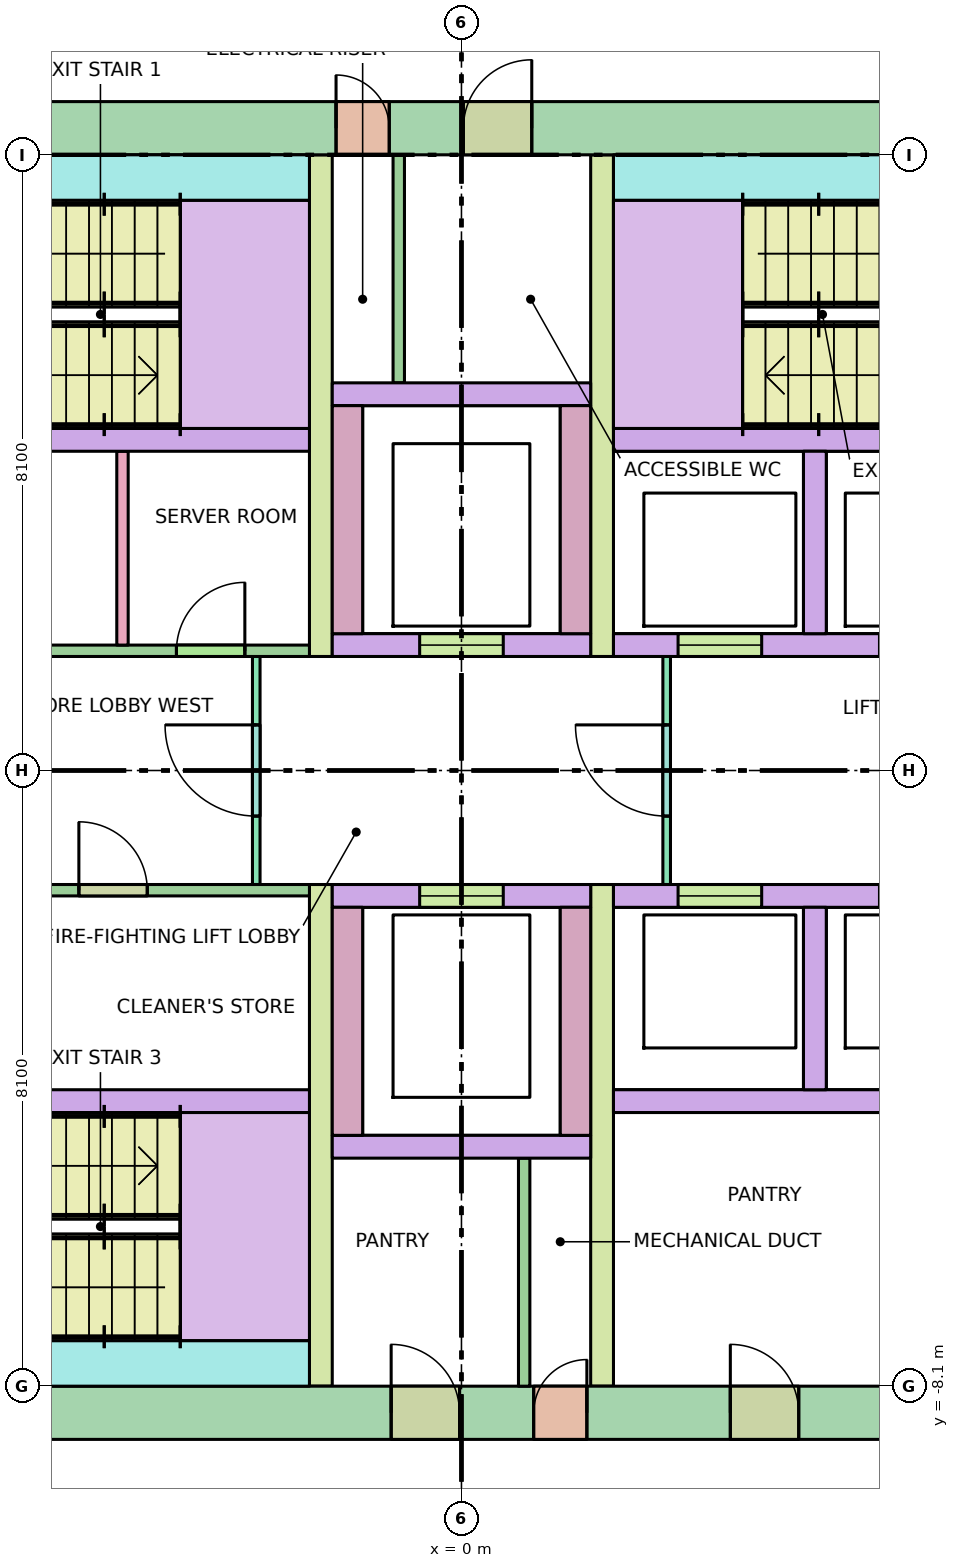
"""IFC4 building model, lengths in metres.
Left out: names, types, materials, properties, quantities, classifications, styles, units other than length and angle.
Written with IfcOpenShell. Run it as: python <this file> out.ifc"""

import sys

from ifc_helpers import new_model, si_unit, direction, frame, frame_2d, origin, place, context, subcontext, project, spatial, rectangle, extrude, element, fill, save


model = new_model("IFC4")
c1 = context("Model", 3, precision=1e-05, world=origin(), true_north=direction((0.0, 1.0)))
c2 = subcontext(c1, "Body", "Model", "MODEL_VIEW")
j1 = project(units=[si_unit("LENGTHUNIT", "METRE"), si_unit("PLANEANGLEUNIT", "RADIAN")], contexts=[c1])
p1 = place(None, origin())
s1 = spatial("IfcSite", under=j1, at=p1, CompositionType="ELEMENT")
p2 = place(p1, origin())
s2 = spatial("IfcBuilding", under=s1, at=p2, CompositionType="ELEMENT")
p3 = place(p2, frame((0.0, 0.0, 218.7)))
s3 = spatial("IfcBuildingStorey", under=s2, at=p3, CompositionType="ELEMENT", Elevation=218.7)
p4 = place(p3, frame((-7.13, 8.45, -0.28), z_axis=(0.0, 0.0, 1.0), x_axis=(1.0, 0.0, 0.0)))
e1 = element("IfcWall", 1, at=p4, inside=s3, PredefinedType="SHEAR", context=c2, shape_type="SweptSolid", body=[
    extrude(rectangle(XDim=14.26, YDim=0.7, at=frame_2d((7.13, 0.0))), origin(), (0.0, 0.0, 1.0), 7.4),
])
p5 = place(p4, frame((5.48, 0.0, 0.28)))
e2 = element("IfcOpeningElement", 2, at=p5, cuts=e1, PredefinedType="OPENING", context=c2, shape_type="SweptSolid", body=[
    extrude(rectangle(XDim=0.7, YDim=2.1, at=frame_2d((0.35, 1.05))), frame((0.0, 0.36, 0.0), z_axis=(0.0, -1.0, 0.0), x_axis=(1.0, 0.0, 0.0)), (0.0, 0.0, 1.0), 0.72),
])
p6 = place(p4, frame((7.155, 0.0, 0.28)))
e3 = element("IfcOpeningElement", 3, at=p6, cuts=e1, PredefinedType="OPENING", context=c2, shape_type="SweptSolid", body=[
    extrude(rectangle(XDim=0.9, YDim=2.1, at=frame_2d((0.45, 1.05))), frame((0.0, 0.36, 0.0), z_axis=(0.0, -1.0, 0.0), x_axis=(1.0, 0.0, 0.0)), (0.0, 0.0, 1.0), 0.72),
])
p7 = place(p3, frame((-7.13, -8.45, -0.28), z_axis=(0.0, 0.0, 1.0), x_axis=(1.0, 0.0, 0.0)))
e4 = element("IfcWall", 4, at=p7, inside=s3, PredefinedType="SHEAR", context=c2, shape_type="SweptSolid", body=[
    extrude(rectangle(XDim=14.26, YDim=0.7, at=frame_2d((7.13, 0.0))), origin(), (0.0, 0.0, 1.0), 7.4),
])
p8 = place(p7, frame((8.08, 0.0, 0.28)))
e5 = element("IfcOpeningElement", 5, at=p8, cuts=e4, PredefinedType="OPENING", context=c2, shape_type="SweptSolid", body=[
    extrude(rectangle(XDim=0.7, YDim=2.1, at=frame_2d((0.35, 1.05))), frame((0.0, 0.36, 0.0), z_axis=(0.0, -1.0, 0.0), x_axis=(1.0, 0.0, 0.0)), (0.0, 0.0, 1.0), 0.72),
])
p9 = place(p7, frame((6.205, 0.0, 0.28)))
e6 = element("IfcOpeningElement", 6, at=p9, cuts=e4, PredefinedType="OPENING", context=c2, shape_type="SweptSolid", body=[
    extrude(rectangle(XDim=0.9, YDim=2.1, at=frame_2d((0.45, 1.05))), frame((0.0, 0.36, 0.0), z_axis=(0.0, -1.0, 0.0), x_axis=(1.0, 0.0, 0.0)), (0.0, 0.0, 1.0), 0.72),
])
p10 = place(p7, frame((10.667, 0.0, 0.28)))
e7 = element("IfcOpeningElement", 7, at=p10, cuts=e4, PredefinedType="OPENING", context=c2, shape_type="SweptSolid", body=[
    extrude(rectangle(XDim=0.9, YDim=2.1, at=frame_2d((0.45, 1.05))), frame((0.0, 0.36, 0.0), z_axis=(0.0, -1.0, 0.0), x_axis=(1.0, 0.0, 0.0)), (0.0, 0.0, 1.0), 0.72),
])
for number, where, z_axis, x_axis in (
    (8, (-10.1, 4.35, 0.0), (0.0, 0.0, 1.0), (1.0, 0.0, 0.0)),
    (9, (-10.1, -4.35, 0.0), (0.0, 0.0, 1.0), (1.0, 0.0, 0.0)),
    (10, (2.0, 4.35, 0.0), (0.0, 0.0, 1.0), (1.0, 0.0, 0.0)),
    (11, (2.0, -4.35, 0.0), (0.0, 0.0, 1.0), (1.0, 0.0, 0.0)),
):
    element("IfcWall", number, at=place(p3, frame(where, z_axis=z_axis, x_axis=x_axis)), inside=s3, PredefinedType="SOLIDWALL", context=c2, shape_type="SweptSolid", body=[
        extrude(rectangle(XDim=8.1, YDim=0.3, at=frame_2d((4.05, 0.0))), origin(), (0.0, 0.0, 1.0), 7.12),
    ])
p11 = place(p3, frame((2.0, 1.65, 0.0), z_axis=(0.0, 0.0, 1.0), x_axis=(1.0, 0.0, 0.0)))
e12 = element("IfcWall", 12, at=p11, inside=s3, PredefinedType="SOLIDWALL", context=c2, shape_type="SweptSolid", body=[
    extrude(rectangle(XDim=8.1, YDim=0.3, at=frame_2d((4.05, 0.0))), origin(), (0.0, 0.0, 1.0), 7.12),
])
p12 = place(p11, frame((0.85, 0.0, 0.0)))
e13 = element("IfcOpeningElement", 13, at=p12, cuts=e12, PredefinedType="OPENING", context=c2, shape_type="SweptSolid", body=[
    extrude(rectangle(XDim=1.1, YDim=2.1, at=frame_2d((0.55, 1.05))), frame((0.0, 0.16, 0.0), z_axis=(0.0, -1.0, 0.0), x_axis=(1.0, 0.0, 0.0)), (0.0, 0.0, 1.0), 0.32),
])
p13 = place(p11, frame((3.5, 0.0, 0.0)))
e14 = element("IfcOpeningElement", 14, at=p13, cuts=e12, PredefinedType="OPENING", context=c2, shape_type="SweptSolid", body=[
    extrude(rectangle(XDim=1.1, YDim=2.1, at=frame_2d((0.55, 1.05))), frame((0.0, 0.16, 0.0), z_axis=(0.0, -1.0, 0.0), x_axis=(1.0, 0.0, 0.0)), (0.0, 0.0, 1.0), 0.32),
])
p14 = place(p11, frame((6.3, 0.0, 0.0)))
e15 = element("IfcOpeningElement", 15, at=p14, cuts=e12, PredefinedType="OPENING", context=c2, shape_type="SweptSolid", body=[
    extrude(rectangle(XDim=1.1, YDim=2.1, at=frame_2d((0.55, 1.05))), frame((0.0, 0.16, 0.0), z_axis=(0.0, -1.0, 0.0), x_axis=(1.0, 0.0, 0.0)), (0.0, 0.0, 1.0), 0.32),
])
p15 = place(p3, frame((2.0, -1.65, 0.0), z_axis=(0.0, 0.0, 1.0), x_axis=(1.0, 0.0, 0.0)))
e16 = element("IfcWall", 16, at=p15, inside=s3, PredefinedType="SOLIDWALL", context=c2, shape_type="SweptSolid", body=[
    extrude(rectangle(XDim=8.1, YDim=0.3, at=frame_2d((4.05, 0.0))), origin(), (0.0, 0.0, 1.0), 7.12),
])
p16 = place(p15, frame((0.85, 0.0, 0.0)))
e17 = element("IfcOpeningElement", 17, at=p16, cuts=e16, PredefinedType="OPENING", context=c2, shape_type="SweptSolid", body=[
    extrude(rectangle(XDim=1.1, YDim=2.1, at=frame_2d((0.55, 1.05))), frame((0.0, 0.16, 0.0), z_axis=(0.0, -1.0, 0.0), x_axis=(1.0, 0.0, 0.0)), (0.0, 0.0, 1.0), 0.32),
])
p17 = place(p15, frame((3.5, 0.0, 0.0)))
e18 = element("IfcOpeningElement", 18, at=p17, cuts=e16, PredefinedType="OPENING", context=c2, shape_type="SweptSolid", body=[
    extrude(rectangle(XDim=1.1, YDim=2.1, at=frame_2d((0.55, 1.05))), frame((0.0, 0.16, 0.0), z_axis=(0.0, -1.0, 0.0), x_axis=(1.0, 0.0, 0.0)), (0.0, 0.0, 1.0), 0.32),
])
p18 = place(p15, frame((6.3, 0.0, 0.0)))
e19 = element("IfcOpeningElement", 19, at=p18, cuts=e16, PredefinedType="OPENING", context=c2, shape_type="SweptSolid", body=[
    extrude(rectangle(XDim=1.1, YDim=2.1, at=frame_2d((0.55, 1.05))), frame((0.0, 0.16, 0.0), z_axis=(0.0, -1.0, 0.0), x_axis=(1.0, 0.0, 0.0)), (0.0, 0.0, 1.0), 0.32),
])
for number, where, z_axis, x_axis in (
    (20, (4.65, 1.8, 0.0), (0.0, 0.0, 1.0), (0.0, 1.0, 0.0)),
    (21, (4.65, -4.2, 0.0), (0.0, 0.0, 1.0), (0.0, 1.0, 0.0)),
):
    element("IfcWall", number, at=place(p3, frame(where, z_axis=z_axis, x_axis=x_axis)), inside=s3, PredefinedType="SOLIDWALL", context=c2, shape_type="SweptSolid", body=[
        extrude(rectangle(XDim=2.4, YDim=0.3, at=frame_2d((1.2, 0.0))), origin(), (0.0, 0.0, 1.0), 7.12),
    ])
for number, where, z_axis, x_axis in (
    (22, (-1.85, 1.5, 0.0), (0.0, 0.0, 1.0), (0.0, 1.0, 0.0)),
    (23, (-1.85, -8.1, 0.0), (0.0, 0.0, 1.0), (0.0, 1.0, 0.0)),
    (24, (1.85, 1.5, 0.0), (0.0, 0.0, 1.0), (0.0, 1.0, 0.0)),
    (25, (1.85, -8.1, 0.0), (0.0, 0.0, 1.0), (0.0, 1.0, 0.0)),
):
    element("IfcWall", number, at=place(p3, frame(where, z_axis=z_axis, x_axis=x_axis)), inside=s3, PredefinedType="SHEAR", context=c2, shape_type="SweptSolid", body=[
        extrude(rectangle(XDim=6.6, YDim=0.3, at=frame_2d((3.3, 0.0))), origin(), (0.0, 0.0, 1.0), 7.12),
    ])
p19 = place(p3, frame((-1.7, 1.65, 0.0), z_axis=(0.0, 0.0, 1.0), x_axis=(1.0, 0.0, 0.0)))
e26 = element("IfcWall", 26, at=p19, inside=s3, PredefinedType="SOLIDWALL", context=c2, shape_type="SweptSolid", body=[
    extrude(rectangle(XDim=3.4, YDim=0.3, at=frame_2d((1.7, 0.0))), origin(), (0.0, 0.0, 1.0), 7.12),
])
p20 = place(p19, frame((1.15, 0.0, 0.0)))
e27 = element("IfcOpeningElement", 27, at=p20, cuts=e26, PredefinedType="OPENING", context=c2, shape_type="SweptSolid", body=[
    extrude(rectangle(XDim=1.1, YDim=2.1, at=frame_2d((0.55, 1.05))), frame((0.0, 0.16, 0.0), z_axis=(0.0, -1.0, 0.0), x_axis=(1.0, 0.0, 0.0)), (0.0, 0.0, 1.0), 0.32),
])
p21 = place(p3, frame((-1.7, -1.65, 0.0), z_axis=(0.0, 0.0, 1.0), x_axis=(1.0, 0.0, 0.0)))
e28 = element("IfcWall", 28, at=p21, inside=s3, PredefinedType="SOLIDWALL", context=c2, shape_type="SweptSolid", body=[
    extrude(rectangle(XDim=3.4, YDim=0.3, at=frame_2d((1.7, 0.0))), origin(), (0.0, 0.0, 1.0), 7.12),
])
p22 = place(p21, frame((1.15, 0.0, 0.0)))
e29 = element("IfcOpeningElement", 29, at=p22, cuts=e28, PredefinedType="OPENING", context=c2, shape_type="SweptSolid", body=[
    extrude(rectangle(XDim=1.1, YDim=2.1, at=frame_2d((0.55, 1.05))), frame((0.0, 0.16, 0.0), z_axis=(0.0, -1.0, 0.0), x_axis=(1.0, 0.0, 0.0)), (0.0, 0.0, 1.0), 0.32),
])
for number, where, z_axis, x_axis in (
    (30, (-1.5, 1.8, 0.0), (0.0, 0.0, 1.0), (0.0, 1.0, 0.0)),
    (31, (-1.5, -4.8, 0.0), (0.0, 0.0, 1.0), (0.0, 1.0, 0.0)),
    (32, (1.5, 1.8, 0.0), (0.0, 0.0, 1.0), (0.0, 1.0, 0.0)),
    (33, (1.5, -4.8, 0.0), (0.0, 0.0, 1.0), (0.0, 1.0, 0.0)),
):
    element("IfcWall", number, at=place(p3, frame(where, z_axis=z_axis, x_axis=x_axis)), inside=s3, PredefinedType="SOLIDWALL", context=c2, shape_type="SweptSolid", body=[
        extrude(rectangle(XDim=3.0, YDim=0.4, at=frame_2d((1.5, 0.0))), origin(), (0.0, 0.0, 1.0), 7.12),
    ])
for number, where, z_axis, x_axis in (
    (34, (-1.7, 4.95, 0.0), (0.0, 0.0, 1.0), (1.0, 0.0, 0.0)),
    (35, (-1.7, -4.95, 0.0), (0.0, 0.0, 1.0), (1.0, 0.0, 0.0)),
):
    element("IfcWall", number, at=place(p3, frame(where, z_axis=z_axis, x_axis=x_axis)), inside=s3, PredefinedType="SOLIDWALL", context=c2, shape_type="SweptSolid", body=[
        extrude(rectangle(XDim=3.4, YDim=0.3, at=frame_2d((1.7, 0.0))), origin(), (0.0, 0.0, 1.0), 7.12),
    ])
for number, where, z_axis, x_axis in (
    (36, (-7.37, 7.8, 0.0), (0.0, 0.0, 1.0), (1.0, 0.0, 0.0)),
    (37, (2.0, 7.8, 0.0), (0.0, 0.0, 1.0), (1.0, 0.0, 0.0)),
    (38, (-7.37, -7.8, 0.0), (0.0, 0.0, 1.0), (1.0, 0.0, 0.0)),
):
    element("IfcWall", number, at=place(p3, frame(where, z_axis=z_axis, x_axis=x_axis)), inside=s3, PredefinedType="SHEAR", context=c2, shape_type="SweptSolid", body=[
        extrude(rectangle(XDim=5.37, YDim=0.6, at=frame_2d((2.685, 0.0))), origin(), (0.0, 0.0, 1.0), 7.12),
    ])
p23 = place(p3, frame((-2.7, -1.5, 0.0), z_axis=(0.0, 0.0, 1.0), x_axis=(0.0, 1.0, 0.0)))
e39 = element("IfcWall", 39, at=p23, inside=s3, PredefinedType="PARTITIONING", context=c2, shape_type="SweptSolid", body=[
    extrude(rectangle(XDim=3.0, YDim=0.1, at=frame_2d((1.5, 0.0))), origin(), (0.0, 0.0, 1.0), 7.12),
])
p24 = place(p23, frame((0.9, 0.0, 0.0)))
e40 = element("IfcOpeningElement", 40, at=p24, cuts=e39, PredefinedType="OPENING", context=c2, shape_type="SweptSolid", body=[
    extrude(rectangle(XDim=1.2, YDim=2.1, at=frame_2d((0.6, 1.05))), frame((0.0, 0.06, 0.0), z_axis=(0.0, -1.0, 0.0), x_axis=(1.0, 0.0, 0.0)), (0.0, 0.0, 1.0), 0.12),
])
p25 = place(p3, frame((2.7, -1.5, 0.0), z_axis=(0.0, 0.0, 1.0), x_axis=(0.0, 1.0, 0.0)))
e41 = element("IfcWall", 41, at=p25, inside=s3, PredefinedType="PARTITIONING", context=c2, shape_type="SweptSolid", body=[
    extrude(rectangle(XDim=3.0, YDim=0.1, at=frame_2d((1.5, 0.0))), origin(), (0.0, 0.0, 1.0), 7.12),
])
p26 = place(p25, frame((0.9, 0.0, 0.0)))
e42 = element("IfcOpeningElement", 42, at=p26, cuts=e41, PredefinedType="OPENING", context=c2, shape_type="SweptSolid", body=[
    extrude(rectangle(XDim=1.2, YDim=2.1, at=frame_2d((0.6, 1.05))), frame((0.0, 0.06, 0.0), z_axis=(0.0, -1.0, 0.0), x_axis=(1.0, 0.0, 0.0)), (0.0, 0.0, 1.0), 0.12),
])
for number, where, z_axis, x_axis in (
    (43, (-0.825, 5.1, 0.0), (0.0, 0.0, 1.0), (0.0, 1.0, 0.0)),
    (44, (0.825, -8.1, 0.0), (0.0, 0.0, 1.0), (0.0, 1.0, 0.0)),
):
    element("IfcWall", number, at=place(p3, frame(where, z_axis=z_axis, x_axis=x_axis)), inside=s3, PredefinedType="PARTITIONING", context=c2, shape_type="SweptSolid", body=[
        extrude(rectangle(XDim=3.0, YDim=0.15, at=frame_2d((1.5, 0.0))), origin(), (0.0, 0.0, 1.0), 7.12),
    ])
p27 = place(p3, frame((-4.46, 1.65, 0.0), z_axis=(0.0, 0.0, 1.0), x_axis=(0.0, 1.0, 0.0)))
e45 = element("IfcWall", 45, at=p27, inside=s3, PredefinedType="PARTITIONING", context=c2, shape_type="SweptSolid", body=[
    extrude(rectangle(XDim=2.55, YDim=0.15, at=frame_2d((1.275, 0.0))), origin(), (0.0, 0.0, 1.0), 7.12),
])
p28 = place(p3, frame((-10.1, 1.575, 0.0), z_axis=(0.0, 0.0, 1.0), x_axis=(1.0, 0.0, 0.0)))
e46 = element("IfcWall", 46, at=p28, inside=s3, PredefinedType="PARTITIONING", context=c2, shape_type="SweptSolid", body=[
    extrude(rectangle(XDim=8.1, YDim=0.15, at=frame_2d((4.05, 0.0))), origin(), (0.0, 0.0, 1.0), 7.12),
])
p29 = place(p28, frame((2.333, 0.0, 0.0)))
e47 = element("IfcOpeningElement", 47, at=p29, cuts=e46, PredefinedType="OPENING", context=c2, shape_type="SweptSolid", body=[
    extrude(rectangle(XDim=0.9, YDim=2.1, at=frame_2d((0.45, 1.05))), frame((0.0, 0.085, 0.0), z_axis=(0.0, -1.0, 0.0), x_axis=(1.0, 0.0, 0.0)), (0.0, 0.0, 1.0), 0.17),
])
p30 = place(p28, frame((6.35, 0.0, 0.0)))
e48 = element("IfcOpeningElement", 48, at=p30, cuts=e46, PredefinedType="OPENING", context=c2, shape_type="SweptSolid", body=[
    extrude(rectangle(XDim=0.9, YDim=2.1, at=frame_2d((0.45, 1.05))), frame((0.0, 0.085, 0.0), z_axis=(0.0, -1.0, 0.0), x_axis=(1.0, 0.0, 0.0)), (0.0, 0.0, 1.0), 0.17),
])
p31 = place(p3, frame((-10.1, -1.575, 0.0), z_axis=(0.0, 0.0, 1.0), x_axis=(1.0, 0.0, 0.0)))
e49 = element("IfcWall", 49, at=p31, inside=s3, PredefinedType="PARTITIONING", context=c2, shape_type="SweptSolid", body=[
    extrude(rectangle(XDim=8.1, YDim=0.15, at=frame_2d((4.05, 0.0))), origin(), (0.0, 0.0, 1.0), 7.12),
])
p32 = place(p31, frame((0.941, 0.0, 0.0)))
e50 = element("IfcOpeningElement", 50, at=p32, cuts=e49, PredefinedType="OPENING", context=c2, shape_type="SweptSolid", body=[
    extrude(rectangle(XDim=0.9, YDim=2.1, at=frame_2d((0.45, 1.05))), frame((0.0, 0.085, 0.0), z_axis=(0.0, -1.0, 0.0), x_axis=(1.0, 0.0, 0.0)), (0.0, 0.0, 1.0), 0.17),
])
p33 = place(p31, frame((5.066, 0.0, 0.0)))
e51 = element("IfcOpeningElement", 51, at=p33, cuts=e49, PredefinedType="OPENING", context=c2, shape_type="SweptSolid", body=[
    extrude(rectangle(XDim=0.9, YDim=2.1, at=frame_2d((0.45, 1.05))), frame((0.0, 0.085, 0.0), z_axis=(0.0, -1.0, 0.0), x_axis=(1.0, 0.0, 0.0)), (0.0, 0.0, 1.0), 0.17),
])
p34 = place(p12, origin())
e52 = element("IfcDoor", 52, at=p34, inside=s3, OperationType="DOUBLE_DOOR_SLIDING", PredefinedType="DOOR", context=c2, shape_type="SweptSolid", body=[
    extrude(rectangle(XDim=1.1, YDim=2.1, at=frame_2d((0.55, 1.05))), frame((0.0, 0.025, 0.0), z_axis=(0.0, -1.0, 0.0), x_axis=(1.0, 0.0, 0.0)), (0.0, 0.0, 1.0), 0.05),
])
fill(e13, e52)
p35 = place(p16, origin())
e53 = element("IfcDoor", 53, at=p35, inside=s3, OperationType="DOUBLE_DOOR_SLIDING", PredefinedType="DOOR", context=c2, shape_type="SweptSolid", body=[
    extrude(rectangle(XDim=1.1, YDim=2.1, at=frame_2d((0.55, 1.05))), frame((0.0, 0.025, 0.0), z_axis=(0.0, -1.0, 0.0), x_axis=(1.0, 0.0, 0.0)), (0.0, 0.0, 1.0), 0.05),
])
fill(e17, e53)
p36 = place(p20, origin())
e54 = element("IfcDoor", 54, at=p36, inside=s3, OperationType="DOUBLE_DOOR_SLIDING", PredefinedType="DOOR", context=c2, shape_type="SweptSolid", body=[
    extrude(rectangle(XDim=1.1, YDim=2.1, at=frame_2d((0.55, 1.05))), frame((0.0, 0.025, 0.0), z_axis=(0.0, -1.0, 0.0), x_axis=(1.0, 0.0, 0.0)), (0.0, 0.0, 1.0), 0.05),
])
fill(e27, e54)
p37 = place(p22, origin())
e55 = element("IfcDoor", 55, at=p37, inside=s3, OperationType="DOUBLE_DOOR_SLIDING", PredefinedType="DOOR", context=c2, shape_type="SweptSolid", body=[
    extrude(rectangle(XDim=1.1, YDim=2.1, at=frame_2d((0.55, 1.05))), frame((0.0, 0.025, 0.0), z_axis=(0.0, -1.0, 0.0), x_axis=(1.0, 0.0, 0.0)), (0.0, 0.0, 1.0), 0.05),
])
fill(e29, e55)
p38 = place(p24, origin())
e56 = element("IfcDoor", 56, at=p38, inside=s3, OperationType="SINGLE_SWING_RIGHT", PredefinedType="DOOR", context=c2, shape_type="SweptSolid", body=[
    extrude(rectangle(XDim=1.2, YDim=2.1, at=frame_2d((0.6, 1.05))), frame((0.0, 0.025, 0.0), z_axis=(0.0, -1.0, 0.0), x_axis=(1.0, 0.0, 0.0)), (0.0, 0.0, 1.0), 0.05),
])
fill(e40, e56)
p39 = place(p26, origin())
e57 = element("IfcDoor", 57, at=p39, inside=s3, OperationType="SINGLE_SWING_RIGHT", PredefinedType="DOOR", context=c2, shape_type="SweptSolid", body=[
    extrude(rectangle(XDim=1.2, YDim=2.1, at=frame_2d((0.6, 1.05))), frame((0.0, 0.025, 0.0), z_axis=(0.0, -1.0, 0.0), x_axis=(1.0, 0.0, 0.0)), (0.0, 0.0, 1.0), 0.05),
])
fill(e42, e57)
p40 = place(p5, origin())
e58 = element("IfcDoor", 58, at=p40, inside=s3, OperationType="SINGLE_SWING_LEFT", PredefinedType="DOOR", context=c2, shape_type="SweptSolid", body=[
    extrude(rectangle(XDim=0.7, YDim=2.1, at=frame_2d((0.35, 1.05))), frame((0.0, 0.025, 0.0), z_axis=(0.0, -1.0, 0.0), x_axis=(1.0, 0.0, 0.0)), (0.0, 0.0, 1.0), 0.05),
])
fill(e2, e58)
p41 = place(p8, origin())
e59 = element("IfcDoor", 59, at=p41, inside=s3, OperationType="SINGLE_SWING_RIGHT", PredefinedType="DOOR", context=c2, shape_type="SweptSolid", body=[
    extrude(rectangle(XDim=0.7, YDim=2.1, at=frame_2d((0.35, 1.05))), frame((0.0, 0.025, 0.0), z_axis=(0.0, -1.0, 0.0), x_axis=(1.0, 0.0, 0.0)), (0.0, 0.0, 1.0), 0.05),
])
fill(e5, e59)
p42 = place(p6, origin())
e60 = element("IfcDoor", 60, at=p42, inside=s3, OperationType="SINGLE_SWING_RIGHT", PredefinedType="DOOR", context=c2, shape_type="SweptSolid", body=[
    extrude(rectangle(XDim=0.9, YDim=2.1, at=frame_2d((0.45, 1.05))), frame((0.0, 0.025, 0.0), z_axis=(0.0, -1.0, 0.0), x_axis=(1.0, 0.0, 0.0)), (0.0, 0.0, 1.0), 0.05),
])
fill(e3, e60)
p43 = place(p9, origin())
e61 = element("IfcDoor", 61, at=p43, inside=s3, OperationType="SINGLE_SWING_LEFT", PredefinedType="DOOR", context=c2, shape_type="SweptSolid", body=[
    extrude(rectangle(XDim=0.9, YDim=2.1, at=frame_2d((0.45, 1.05))), frame((0.0, 0.025, 0.0), z_axis=(0.0, -1.0, 0.0), x_axis=(1.0, 0.0, 0.0)), (0.0, 0.0, 1.0), 0.05),
])
fill(e6, e61)
p44 = place(p10, origin())
e62 = element("IfcDoor", 62, at=p44, inside=s3, OperationType="SINGLE_SWING_LEFT", PredefinedType="DOOR", context=c2, shape_type="SweptSolid", body=[
    extrude(rectangle(XDim=0.9, YDim=2.1, at=frame_2d((0.45, 1.05))), frame((0.0, 0.025, 0.0), z_axis=(0.0, -1.0, 0.0), x_axis=(1.0, 0.0, 0.0)), (0.0, 0.0, 1.0), 0.05),
])
fill(e7, e62)
p45 = place(p30, origin())
e63 = element("IfcDoor", 63, at=p45, inside=s3, OperationType="SINGLE_SWING_RIGHT", PredefinedType="DOOR", context=c2, shape_type="SweptSolid", body=[
    extrude(rectangle(XDim=0.9, YDim=2.1, at=frame_2d((0.45, 1.05))), frame((0.0, 0.025, 0.0), z_axis=(0.0, -1.0, 0.0), x_axis=(1.0, 0.0, 0.0)), (0.0, 0.0, 1.0), 0.05),
])
fill(e48, e63)
p46 = place(p33, origin())
e64 = element("IfcDoor", 64, at=p46, inside=s3, OperationType="SINGLE_SWING_LEFT", PredefinedType="DOOR", context=c2, shape_type="SweptSolid", body=[
    extrude(rectangle(XDim=0.9, YDim=2.1, at=frame_2d((0.45, 1.05))), frame((0.0, 0.025, 0.0), z_axis=(0.0, -1.0, 0.0), x_axis=(1.0, 0.0, 0.0)), (0.0, 0.0, 1.0), 0.05),
])
fill(e51, e64)
save(model, sys.argv[1])
